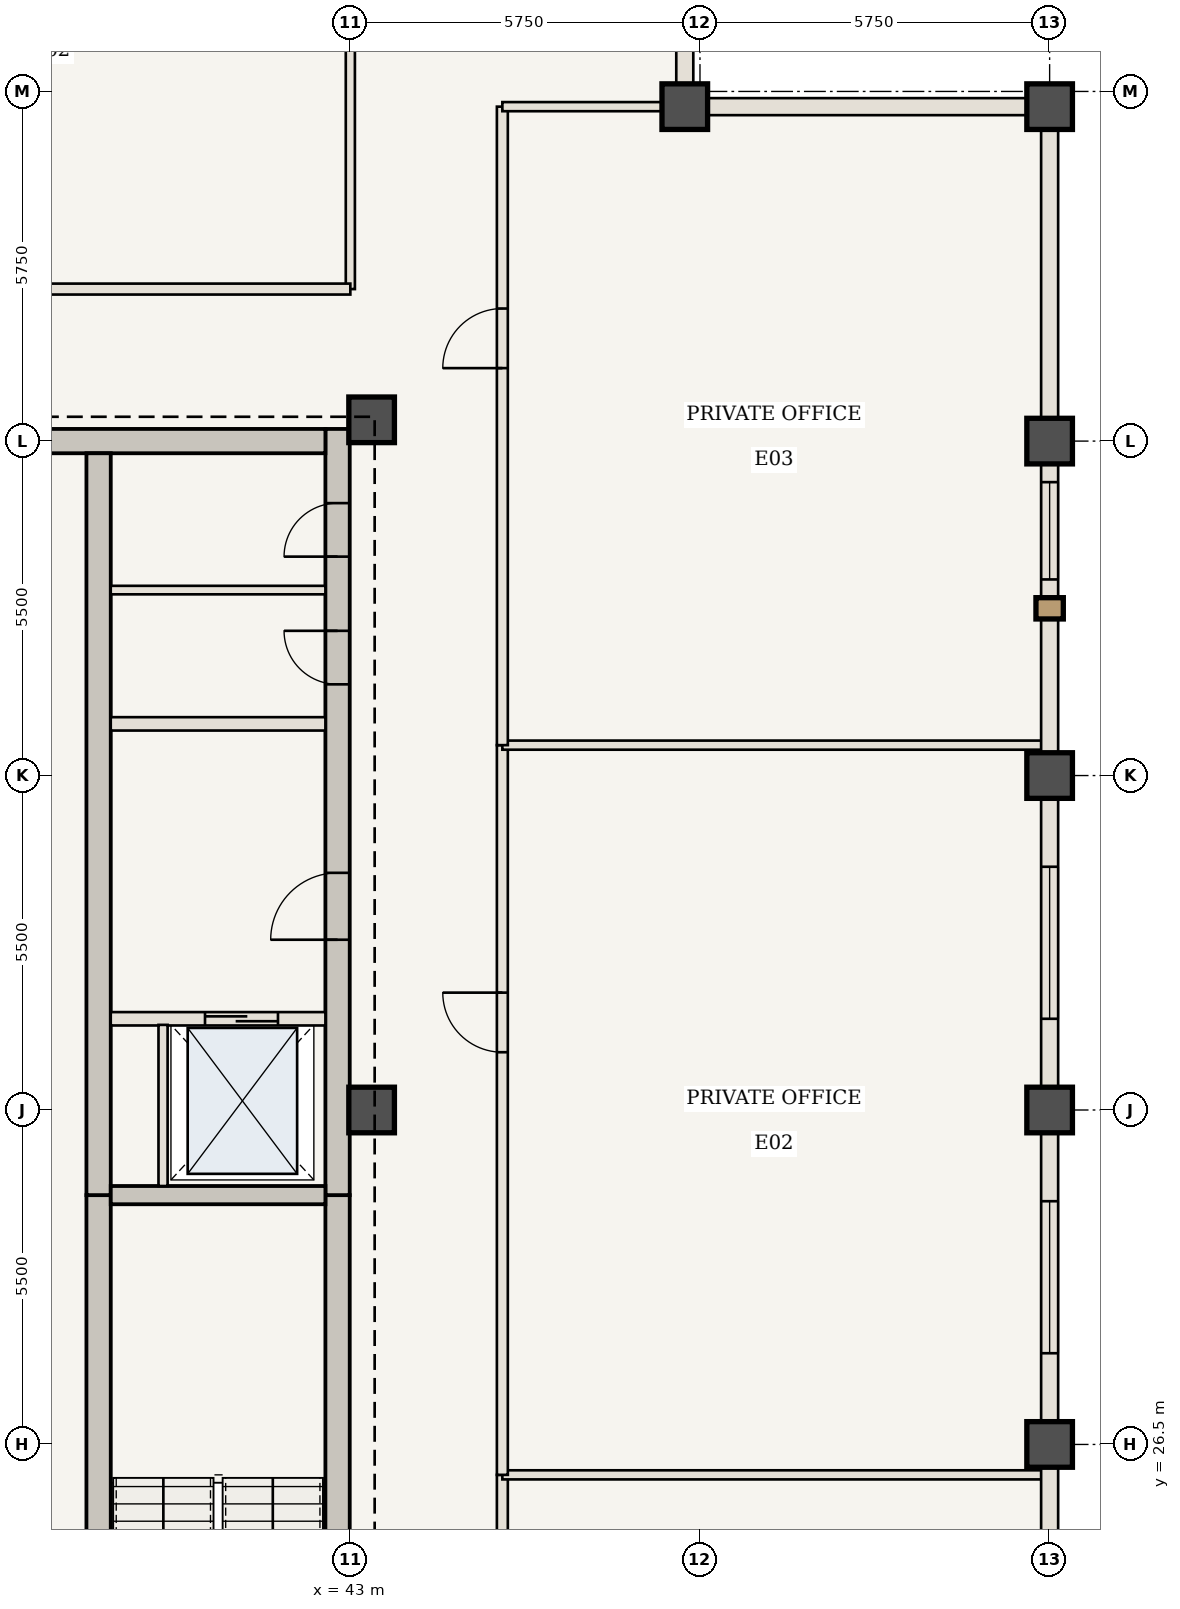
"""IFC4 building model, lengths in metres.
Left out: names, types, materials, properties, quantities, classifications, styles, units other than length and angle.
Written with IfcOpenShell. Run it as: python <this file> out.ifc"""

import sys

from ifc_helpers import new_model, si_unit, direction, frame, frame_2d, origin, origin_2d, place, context, subcontext, project, spatial, rectangle, extrude, element, fill, save


model = new_model("IFC4")
c1 = context("Model", 3, precision=1e-05, world=origin(), true_north=direction((0.0, 1.0)))
c2 = subcontext(c1, "Body", "Model", "MODEL_VIEW")
j1 = project(units=[si_unit("LENGTHUNIT", "METRE"), si_unit("PLANEANGLEUNIT", "RADIAN")], contexts=[c1])
p1 = place(None, origin())
s1 = spatial("IfcSite", under=j1, at=p1, CompositionType="ELEMENT")
p2 = place(p1, origin())
s2 = spatial("IfcBuilding", under=s1, at=p2, CompositionType="ELEMENT")
p3 = place(p2, frame((0.0, 0.0, 266.0)))
s3 = spatial("IfcBuildingStorey", under=s2, at=p3, CompositionType="ELEMENT", Elevation=266.0)
p4 = place(p3, frame((42.79, 20.75, 0.0), z_axis=(0.0, 0.0, 1.0), x_axis=(0.0, 1.0, 0.0)))
e1 = element("IfcWall", 1, at=p4, inside=s3, PredefinedType="SHEAR", context=c2, shape_type="SweptSolid", body=[
    extrude(rectangle(XDim=9.85, YDim=0.4, at=frame_2d((4.925, 0.0))), origin(), (0.0, 0.0, 1.0), 3.85),
])
p5 = place(p4, frame((1.0, 0.0, 0.0)))
e2 = element("IfcOpeningElement", 2, at=p5, cuts=e1, PredefinedType="OPENING", context=c2, shape_type="SweptSolid", body=[
    extrude(rectangle(XDim=1.15, YDim=2.15, at=frame_2d((0.575, 1.075))), frame((0.0, 0.21, 0.0), z_axis=(0.0, -1.0, 0.0), x_axis=(1.0, 0.0, 0.0)), (0.0, 0.0, 1.0), 0.42),
])
p6 = place(p3, frame((42.79, 30.6, 0.0), z_axis=(0.0, 0.0, 1.0), x_axis=(0.0, 1.0, 0.0)))
e3 = element("IfcWall", 3, at=p6, inside=s3, PredefinedType="SHEAR", context=c2, shape_type="SweptSolid", body=[
    extrude(rectangle(XDim=12.6, YDim=0.4, at=frame_2d((6.3, 0.0))), origin(), (0.0, 0.0, 1.0), 3.85),
])
p7 = place(p6, frame((4.2, 0.0, 0.0)))
e4 = element("IfcOpeningElement", 4, at=p7, cuts=e3, PredefinedType="OPENING", context=c2, shape_type="SweptSolid", body=[
    extrude(rectangle(XDim=1.1, YDim=2.15, at=frame_2d((0.55, 1.075))), frame((0.0, 0.21, 0.0), z_axis=(0.0, -1.0, 0.0), x_axis=(1.0, 0.0, 0.0)), (0.0, 0.0, 1.0), 0.42),
])
p8 = place(p6, frame((8.4, 0.0, 0.0)))
e5 = element("IfcOpeningElement", 5, at=p8, cuts=e3, PredefinedType="OPENING", context=c2, shape_type="SweptSolid", body=[
    extrude(rectangle(XDim=0.88, YDim=2.1, at=frame_2d((0.44, 1.05))), frame((0.0, 0.21, 0.0), z_axis=(0.0, -1.0, 0.0), x_axis=(1.0, 0.0, 0.0)), (0.0, 0.0, 1.0), 0.42),
])
p9 = place(p6, frame((10.5, 0.0, 0.0)))
e6 = element("IfcOpeningElement", 6, at=p9, cuts=e3, PredefinedType="OPENING", context=c2, shape_type="SweptSolid", body=[
    extrude(rectangle(XDim=0.88, YDim=2.1, at=frame_2d((0.44, 1.05))), frame((0.0, 0.21, 0.0), z_axis=(0.0, -1.0, 0.0), x_axis=(1.0, 0.0, 0.0)), (0.0, 0.0, 1.0), 0.42),
])
p10 = place(p3, frame((37.75, 43.0, 0.0), z_axis=(0.0, 0.0, 1.0), x_axis=(1.0, 0.0, 0.0)))
e7 = element("IfcWall", 7, at=p10, inside=s3, PredefinedType="SHEAR", context=c2, shape_type="SweptSolid", body=[
    extrude(rectangle(XDim=4.84, YDim=0.4, at=frame_2d((2.42, 0.0))), origin(), (0.0, 0.0, 1.0), 3.85),
])
p11 = place(p3, frame((38.86, 21.15, 0.0), z_axis=(0.0, 0.0, 1.0), x_axis=(0.0, 1.0, 0.0)))
e8 = element("IfcWall", 8, at=p11, inside=s3, PredefinedType="SHEAR", context=c2, shape_type="SweptSolid", body=[
    extrude(rectangle(XDim=9.45, YDim=0.4, at=frame_2d((4.725, 0.0))), origin(), (0.0, 0.0, 1.0), 3.85),
])
p12 = place(p3, frame((38.86, 30.6, 0.0), z_axis=(0.0, 0.0, 1.0), x_axis=(0.0, 1.0, 0.0)))
e9 = element("IfcWall", 9, at=p12, inside=s3, PredefinedType="SHEAR", context=c2, shape_type="SweptSolid", body=[
    extrude(rectangle(XDim=12.2, YDim=0.4, at=frame_2d((6.1, 0.0))), origin(), (0.0, 0.0, 1.0), 3.85),
])
for number, where, z_axis, x_axis in (
    (10, (43.35, 32.0, 0.0), (0.0, 0.0, 1.0), (1.0, 0.0, 0.0)),
    (11, (43.35, 43.35, 0.0), (0.0, 0.0, 1.0), (1.0, 0.0, 0.0)),
    (12, (54.5, 48.5, 0.0), (0.0, 0.0, 1.0), (1.0, 0.0, 0.0)),
    (13, (48.5, 48.5, 0.0), (0.0, 0.0, 1.0), (1.0, 0.0, 0.0)),
    (14, (54.5, 26.5, 0.0), (0.0, 0.0, 1.0), (1.0, 0.0, 0.0)),
    (15, (54.5, 32.0, 0.0), (0.0, 0.0, 1.0), (1.0, 0.0, 0.0)),
    (16, (54.5, 37.5, 0.0), (0.0, 0.0, 1.0), (1.0, 0.0, 0.0)),
    (17, (54.5, 43.0, 0.0), (0.0, 0.0, 1.0), (1.0, 0.0, 0.0)),
):
    element("IfcColumn", number, at=place(p3, frame(where, z_axis=z_axis, x_axis=x_axis)), inside=s3, PredefinedType="COLUMN", context=c2, shape_type="SweptSolid", body=[
        extrude(rectangle(XDim=0.75, YDim=0.75, at=origin_2d()), origin(), (0.0, 0.0, 1.0), 3.85),
    ])
p13 = place(p3, frame((39.06, 30.6, 0.0), z_axis=(0.0, 0.0, 1.0), x_axis=(1.0, 0.0, 0.0)))
e18 = element("IfcWall", 18, at=p13, inside=s3, PredefinedType="SHEAR", context=c2, shape_type="SweptSolid", body=[
    extrude(rectangle(XDim=3.53, YDim=0.3, at=frame_2d((1.765, 0.0))), origin(), (0.0, 0.0, 1.0), 3.685),
])
p14 = place(p3, frame((39.06, 33.5, 0.0), z_axis=(0.0, 0.0, 1.0), x_axis=(1.0, 0.0, 0.0)))
e19 = element("IfcWall", 19, at=p14, inside=s3, PredefinedType="STANDARD", context=c2, shape_type="SweptSolid", body=[
    extrude(rectangle(XDim=3.53, YDim=0.22, at=frame_2d((1.765, 0.0))), origin(), (0.0, 0.0, 1.0), 3.685),
])
p15 = place(p14, frame((1.55, 0.0, 0.0)))
e20 = element("IfcOpeningElement", 20, at=p15, cuts=e19, PredefinedType="OPENING", context=c2, shape_type="SweptSolid", body=[
    extrude(rectangle(XDim=1.2, YDim=2.2, at=frame_2d((0.6, 1.1))), frame((0.0, 0.12, 0.0), z_axis=(0.0, -1.0, 0.0), x_axis=(1.0, 0.0, 0.0)), (0.0, 0.0, 1.0), 0.24),
])
p16 = place(p3, frame((39.92, 30.75, 0.0), z_axis=(0.0, 0.0, 1.0), x_axis=(0.0, 1.0, 0.0)))
e21 = element("IfcWall", 21, at=p16, inside=s3, PredefinedType="STANDARD", context=c2, shape_type="SweptSolid", body=[
    extrude(rectangle(XDim=2.65, YDim=0.15, at=frame_2d((1.325, 0.0))), origin(), (0.0, 0.0, 1.0), 3.685),
])
p17 = place(p3, frame((39.06, 38.35, 0.0), z_axis=(0.0, 0.0, 1.0), x_axis=(1.0, 0.0, 0.0)))
e22 = element("IfcWall", 22, at=p17, inside=s3, PredefinedType="STANDARD", context=c2, shape_type="SweptSolid", body=[
    extrude(rectangle(XDim=3.53, YDim=0.22, at=frame_2d((1.765, 0.0))), origin(), (0.0, 0.0, 1.0), 3.685),
])
p18 = place(p3, frame((39.06, 40.55, 0.0), z_axis=(0.0, 0.0, 1.0), x_axis=(1.0, 0.0, 0.0)))
e23 = element("IfcWall", 23, at=p18, inside=s3, PredefinedType="STANDARD", context=c2, shape_type="SweptSolid", body=[
    extrude(rectangle(XDim=3.53, YDim=0.14, at=frame_2d((1.765, 0.0))), origin(), (0.0, 0.0, 1.0), 3.685),
])
p19 = place(p3, frame((43.0, 45.5, 0.0), z_axis=(0.0, 0.0, 1.0), x_axis=(0.0, 1.0, 0.0)))
e24 = element("IfcWall", 24, at=p19, inside=s3, PredefinedType="STANDARD", context=c2, shape_type="SweptSolid", body=[
    extrude(rectangle(XDim=8.94, YDim=0.15, at=frame_2d((4.47, 0.0))), origin(), (0.0, 0.0, 1.0), 3.685),
])
p20 = place(p3, frame((31.5, 45.5, 0.0), z_axis=(0.0, 0.0, 1.0), x_axis=(1.0, 0.0, 0.0)))
e25 = element("IfcWall", 25, at=p20, inside=s3, PredefinedType="STANDARD", context=c2, shape_type="SweptSolid", body=[
    extrude(rectangle(XDim=11.5, YDim=0.18, at=frame_2d((5.75, 0.0))), origin(), (0.0, 0.0, 1.0), 3.685),
])
p21 = place(p20, frame((5.225, 0.0, 0.0)))
e26 = element("IfcOpeningElement", 26, at=p21, cuts=e25, PredefinedType="OPENING", context=c2, shape_type="SweptSolid", body=[
    extrude(rectangle(XDim=0.98, YDim=2.2, at=frame_2d((0.49, 1.1))), frame((0.0, 0.1, 0.0), z_axis=(0.0, -1.0, 0.0), x_axis=(1.0, 0.0, 0.0)), (0.0, 0.0, 1.0), 0.2),
])
p22 = place(p3, frame((45.5, 15.5, 0.0), z_axis=(0.0, 0.0, 1.0), x_axis=(0.0, 1.0, 0.0)))
e27 = element("IfcWall", 27, at=p22, inside=s3, PredefinedType="STANDARD", context=c2, shape_type="SweptSolid", body=[
    extrude(rectangle(XDim=10.5, YDim=0.18, at=frame_2d((5.25, 0.0))), origin(), (0.0, 0.0, 1.0), 3.685),
])
p23 = place(p22, frame((6.2, 0.0, 0.0)))
e28 = element("IfcOpeningElement", 28, at=p23, cuts=e27, PredefinedType="OPENING", context=c2, shape_type="SweptSolid", body=[
    extrude(rectangle(XDim=0.98, YDim=2.2, at=frame_2d((0.49, 1.1))), frame((0.0, 0.1, 0.0), z_axis=(0.0, -1.0, 0.0), x_axis=(1.0, 0.0, 0.0)), (0.0, 0.0, 1.0), 0.2),
])
p24 = place(p3, frame((45.5, 26.0, 0.0), z_axis=(0.0, 0.0, 1.0), x_axis=(1.0, 0.0, 0.0)))
e29 = element("IfcWall", 29, at=p24, inside=s3, PredefinedType="STANDARD", context=c2, shape_type="SweptSolid", body=[
    extrude(rectangle(XDim=8.94, YDim=0.15, at=frame_2d((4.47, 0.0))), origin(), (0.0, 0.0, 1.0), 3.685),
])
p25 = place(p3, frame((45.5, 26.0, 0.0), z_axis=(0.0, 0.0, 1.0), x_axis=(0.0, 1.0, 0.0)))
e30 = element("IfcWall", 30, at=p25, inside=s3, PredefinedType="STANDARD", context=c2, shape_type="SweptSolid", body=[
    extrude(rectangle(XDim=12.0, YDim=0.18, at=frame_2d((6.0, 0.0))), origin(), (0.0, 0.0, 1.0), 3.685),
])
p26 = place(p25, frame((6.95, 0.0, 0.0)))
e31 = element("IfcOpeningElement", 31, at=p26, cuts=e30, PredefinedType="OPENING", context=c2, shape_type="SweptSolid", body=[
    extrude(rectangle(XDim=0.98, YDim=2.2, at=frame_2d((0.49, 1.1))), frame((0.0, 0.1, 0.0), z_axis=(0.0, -1.0, 0.0), x_axis=(1.0, 0.0, 0.0)), (0.0, 0.0, 1.0), 0.2),
])
p27 = place(p3, frame((45.5, 38.0, 0.0), z_axis=(0.0, 0.0, 1.0), x_axis=(1.0, 0.0, 0.0)))
e32 = element("IfcWall", 32, at=p27, inside=s3, PredefinedType="STANDARD", context=c2, shape_type="SweptSolid", body=[
    extrude(rectangle(XDim=8.94, YDim=0.15, at=frame_2d((4.47, 0.0))), origin(), (0.0, 0.0, 1.0), 3.685),
])
p28 = place(p3, frame((45.5, 38.0, 0.0), z_axis=(0.0, 0.0, 1.0), x_axis=(0.0, 1.0, 0.0)))
e33 = element("IfcWall", 33, at=p28, inside=s3, PredefinedType="STANDARD", context=c2, shape_type="SweptSolid", body=[
    extrude(rectangle(XDim=10.5, YDim=0.18, at=frame_2d((5.25, 0.0))), origin(), (0.0, 0.0, 1.0), 3.685),
])
p29 = place(p28, frame((6.2, 0.0, 0.0)))
e34 = element("IfcOpeningElement", 34, at=p29, cuts=e33, PredefinedType="OPENING", context=c2, shape_type="SweptSolid", body=[
    extrude(rectangle(XDim=0.98, YDim=2.2, at=frame_2d((0.49, 1.1))), frame((0.0, 0.1, 0.0), z_axis=(0.0, -1.0, 0.0), x_axis=(1.0, 0.0, 0.0)), (0.0, 0.0, 1.0), 0.2),
])
p30 = place(p3, frame((45.5, 48.5, 0.0), z_axis=(0.0, 0.0, 1.0), x_axis=(1.0, 0.0, 0.0)))
e35 = element("IfcWall", 35, at=p30, inside=s3, PredefinedType="STANDARD", context=c2, shape_type="SweptSolid", body=[
    extrude(rectangle(XDim=3.0, YDim=0.15, at=frame_2d((1.5, 0.0))), origin(), (0.0, 0.0, 1.0), 3.685),
])
p31 = place(p3, frame((54.5, 26.5, 0.0), z_axis=(0.0, 0.0, 1.0), x_axis=(0.0, -1.0, 0.0)))
e36 = element("IfcWall", 36, at=p31, inside=s3, PredefinedType="USERDEFINED", context=c2, shape_type="SweptSolid", body=[
    extrude(rectangle(XDim=5.5, YDim=0.28, at=frame_2d((2.75, 0.0))), origin(), (0.0, 0.0, 1.0), 2.985),
])
p32 = place(p31, frame((3.225, 0.0, 0.85)))
e37 = element("IfcOpeningElement", 37, at=p32, cuts=e36, PredefinedType="OPENING", context=c2, shape_type="SweptSolid", body=[
    extrude(rectangle(XDim=1.6, YDim=1.935, at=frame_2d((0.8, 0.968))), frame((0.0, 0.15, 0.0), z_axis=(0.0, -1.0, 0.0), x_axis=(1.0, 0.0, 0.0)), (0.0, 0.0, 1.0), 0.3),
])
p33 = place(p3, frame((54.5, 32.0, 0.0), z_axis=(0.0, 0.0, 1.0), x_axis=(0.0, -1.0, 0.0)))
e38 = element("IfcWall", 38, at=p33, inside=s3, PredefinedType="USERDEFINED", context=c2, shape_type="SweptSolid", body=[
    extrude(rectangle(XDim=5.5, YDim=0.28, at=frame_2d((2.75, 0.0))), origin(), (0.0, 0.0, 1.0), 2.985),
])
p34 = place(p33, frame((1.5, 0.0, 0.85)))
e39 = element("IfcOpeningElement", 39, at=p34, cuts=e38, PredefinedType="OPENING", context=c2, shape_type="SweptSolid", body=[
    extrude(rectangle(XDim=2.5, YDim=1.935, at=frame_2d((1.25, 0.968))), frame((0.0, 0.15, 0.0), z_axis=(0.0, -1.0, 0.0), x_axis=(1.0, 0.0, 0.0)), (0.0, 0.0, 1.0), 0.3),
])
p35 = place(p3, frame((54.5, 37.5, 0.0), z_axis=(0.0, 0.0, 1.0), x_axis=(0.0, -1.0, 0.0)))
e40 = element("IfcWall", 40, at=p35, inside=s3, PredefinedType="USERDEFINED", context=c2, shape_type="SweptSolid", body=[
    extrude(rectangle(XDim=5.5, YDim=0.28, at=frame_2d((2.75, 0.0))), origin(), (0.0, 0.0, 1.0), 2.985),
])
p36 = place(p35, frame((1.5, 0.0, 0.85)))
e41 = element("IfcOpeningElement", 41, at=p36, cuts=e40, PredefinedType="OPENING", context=c2, shape_type="SweptSolid", body=[
    extrude(rectangle(XDim=2.5, YDim=1.935, at=frame_2d((1.25, 0.968))), frame((0.0, 0.15, 0.0), z_axis=(0.0, -1.0, 0.0), x_axis=(1.0, 0.0, 0.0)), (0.0, 0.0, 1.0), 0.3),
])
p37 = place(p3, frame((54.5, 43.0, 0.0), z_axis=(0.0, 0.0, 1.0), x_axis=(0.0, -1.0, 0.0)))
e42 = element("IfcWall", 42, at=p37, inside=s3, PredefinedType="USERDEFINED", context=c2, shape_type="SweptSolid", body=[
    extrude(rectangle(XDim=5.5, YDim=0.28, at=frame_2d((2.75, 0.0))), origin(), (0.0, 0.0, 1.0), 2.985),
])
p38 = place(p37, frame((0.675, 0.0, 0.85)))
e43 = element("IfcOpeningElement", 43, at=p38, cuts=e42, PredefinedType="OPENING", context=c2, shape_type="SweptSolid", body=[
    extrude(rectangle(XDim=1.6, YDim=1.935, at=frame_2d((0.8, 0.968))), frame((0.0, 0.15, 0.0), z_axis=(0.0, -1.0, 0.0), x_axis=(1.0, 0.0, 0.0)), (0.0, 0.0, 1.0), 0.3),
])
p39 = place(p3, frame((54.5, 48.5, 0.0), z_axis=(0.0, 0.0, 1.0), x_axis=(0.0, -1.0, 0.0)))
e44 = element("IfcWall", 44, at=p39, inside=s3, PredefinedType="USERDEFINED", context=c2, shape_type="SweptSolid", body=[
    extrude(rectangle(XDim=5.5, YDim=0.28, at=frame_2d((2.75, 0.0))), origin(), (0.0, 0.0, 1.0), 2.985),
])
for number, where, z_axis, x_axis in (
    (45, (48.5, 48.5, 0.0), (0.0, 0.0, 1.0), (1.0, 0.0, 0.0)),
    (46, (48.5, 54.5, 0.0), (0.0, 0.0, 1.0), (0.0, -1.0, 0.0)),
):
    element("IfcWall", number, at=place(p3, frame(where, z_axis=z_axis, x_axis=x_axis)), inside=s3, PredefinedType="USERDEFINED", context=c2, shape_type="SweptSolid", body=[
        extrude(rectangle(XDim=6.0, YDim=0.28, at=frame_2d((3.0, 0.0))), origin(), (0.0, 0.0, 1.0), 2.985),
    ])
p40 = place(p7, origin())
e47 = element("IfcDoor", 47, at=p40, inside=s3, OperationType="SINGLE_SWING_LEFT", PredefinedType="DOOR", context=c2, shape_type="SweptSolid", body=[
    extrude(rectangle(XDim=1.1, YDim=2.15, at=frame_2d((0.55, 1.075))), frame((0.0, 0.025, 0.0), z_axis=(0.0, -1.0, 0.0), x_axis=(1.0, 0.0, 0.0)), (0.0, 0.0, 1.0), 0.05),
])
fill(e4, e47)
p41 = place(p8, origin())
e48 = element("IfcDoor", 48, at=p41, inside=s3, OperationType="SINGLE_SWING_RIGHT", PredefinedType="DOOR", context=c2, shape_type="SweptSolid", body=[
    extrude(rectangle(XDim=0.88, YDim=2.1, at=frame_2d((0.44, 1.05))), frame((0.0, 0.025, 0.0), z_axis=(0.0, -1.0, 0.0), x_axis=(1.0, 0.0, 0.0)), (0.0, 0.0, 1.0), 0.05),
])
fill(e5, e48)
p42 = place(p9, origin())
e49 = element("IfcDoor", 49, at=p42, inside=s3, OperationType="SINGLE_SWING_LEFT", PredefinedType="DOOR", context=c2, shape_type="SweptSolid", body=[
    extrude(rectangle(XDim=0.88, YDim=2.1, at=frame_2d((0.44, 1.05))), frame((0.0, 0.025, 0.0), z_axis=(0.0, -1.0, 0.0), x_axis=(1.0, 0.0, 0.0)), (0.0, 0.0, 1.0), 0.05),
])
fill(e6, e49)
p43 = place(p15, origin())
e50 = element("IfcDoor", 50, at=p43, inside=s3, OperationType="DOUBLE_DOOR_SLIDING", PredefinedType="DOOR", context=c2, shape_type="SweptSolid", body=[
    extrude(rectangle(XDim=1.2, YDim=2.2, at=frame_2d((0.6, 1.1))), frame((0.0, 0.025, 0.0), z_axis=(0.0, -1.0, 0.0), x_axis=(1.0, 0.0, 0.0)), (0.0, 0.0, 1.0), 0.05),
])
fill(e20, e50)
p44 = place(p26, origin())
e51 = element("IfcDoor", 51, at=p44, inside=s3, OperationType="SINGLE_SWING_RIGHT", PredefinedType="DOOR", context=c2, shape_type="SweptSolid", body=[
    extrude(rectangle(XDim=0.98, YDim=2.2, at=frame_2d((0.49, 1.1))), frame((0.0, 0.025, 0.0), z_axis=(0.0, -1.0, 0.0), x_axis=(1.0, 0.0, 0.0)), (0.0, 0.0, 1.0), 0.05),
])
fill(e31, e51)
p45 = place(p29, origin())
e52 = element("IfcDoor", 52, at=p45, inside=s3, OperationType="SINGLE_SWING_LEFT", PredefinedType="DOOR", context=c2, shape_type="SweptSolid", body=[
    extrude(rectangle(XDim=0.98, YDim=2.2, at=frame_2d((0.49, 1.1))), frame((0.0, 0.025, 0.0), z_axis=(0.0, -1.0, 0.0), x_axis=(1.0, 0.0, 0.0)), (0.0, 0.0, 1.0), 0.05),
])
fill(e34, e52)
p46 = place(p34, origin())
e53 = element("IfcWindow", 53, at=p46, inside=s3, PartitioningType="SINGLE_PANEL", PredefinedType="WINDOW", context=c2, shape_type="SweptSolid", body=[
    extrude(rectangle(XDim=2.5, YDim=1.935, at=frame_2d((1.25, 0.968))), frame((0.0, 0.03, 0.0), z_axis=(0.0, -1.0, 0.0), x_axis=(1.0, 0.0, 0.0)), (0.0, 0.0, 1.0), 0.06),
])
fill(e39, e53)
p47 = place(p36, origin())
e54 = element("IfcWindow", 54, at=p47, inside=s3, PartitioningType="SINGLE_PANEL", PredefinedType="WINDOW", context=c2, shape_type="SweptSolid", body=[
    extrude(rectangle(XDim=2.5, YDim=1.935, at=frame_2d((1.25, 0.968))), frame((0.0, 0.03, 0.0), z_axis=(0.0, -1.0, 0.0), x_axis=(1.0, 0.0, 0.0)), (0.0, 0.0, 1.0), 0.06),
])
fill(e41, e54)
p48 = place(p38, origin())
e55 = element("IfcWindow", 55, at=p48, inside=s3, PartitioningType="SINGLE_PANEL", PredefinedType="WINDOW", context=c2, shape_type="SweptSolid", body=[
    extrude(rectangle(XDim=1.6, YDim=1.935, at=frame_2d((0.8, 0.968))), frame((0.0, 0.03, 0.0), z_axis=(0.0, -1.0, 0.0), x_axis=(1.0, 0.0, 0.0)), (0.0, 0.0, 1.0), 0.06),
])
fill(e43, e55)
save(model, sys.argv[1])
